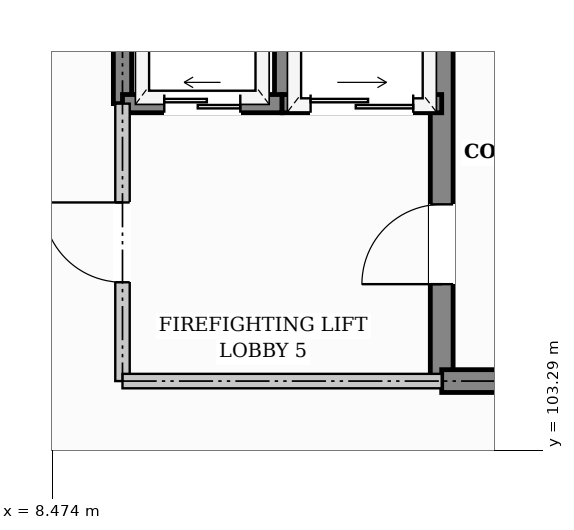
"""IFC4 building model, lengths in metres.
Left out: names, types, materials, properties, quantities, classifications, styles, units other than length and angle.
Written with IfcOpenShell. Run it as: python <this file> out.ifc"""

import sys

from ifc_helpers import new_model, si_unit, direction, frame, frame_2d, origin, place, context, subcontext, project, spatial, rectangle, extrude, element, fill, save


model = new_model("IFC4")
c1 = context("Model", 3, precision=1e-05, world=origin(), true_north=direction((0.0, 1.0)))
c2 = subcontext(c1, "Body", "Model", "MODEL_VIEW")
j1 = project(units=[si_unit("LENGTHUNIT", "METRE"), si_unit("PLANEANGLEUNIT", "RADIAN")], contexts=[c1])
p1 = place(None, origin())
s1 = spatial("IfcSite", under=j1, at=p1, CompositionType="ELEMENT")
p2 = place(p1, origin())
s2 = spatial("IfcBuilding", under=s1, at=p2, CompositionType="ELEMENT")
p3 = place(p2, frame((0.0, 0.0, 13.2)))
s3 = spatial("IfcBuildingStorey", under=s2, at=p3, CompositionType="ELEMENT", Elevation=13.2)
p4 = place(p3, frame((13.6, 104.2, 0.0), z_axis=(0.0, 0.0, 1.0), x_axis=(0.0, 1.0, 0.0)))
e1 = element("IfcWall", 1, at=p4, inside=s3, PredefinedType="SHEAR", context=c2, shape_type="SweptSolid", body=[
    extrude(rectangle(XDim=6.0, YDim=0.3, at=frame_2d((3.0, 0.0))), origin(), (0.0, 0.0, 1.0), 3.3),
])
p5 = place(p4, frame((1.275, 0.0, 0.0)))
e2 = element("IfcOpeningElement", 2, at=p5, cuts=e1, PredefinedType="OPENING", context=c2, shape_type="SweptSolid", body=[
    extrude(rectangle(XDim=1.05, YDim=2.15, at=frame_2d((0.525, 1.075))), frame((0.0, 0.16, 0.0), z_axis=(0.0, -1.0, 0.0), x_axis=(1.0, 0.0, 0.0)), (0.0, 0.0, 1.0), 0.32),
])
p6 = place(p3, frame((13.6, 104.2, 0.0), z_axis=(0.0, 0.0, 1.0), x_axis=(1.0, 0.0, 0.0)))
e3 = element("IfcWall", 3, at=p6, inside=s3, PredefinedType="SHEAR", context=c2, shape_type="SweptSolid", body=[
    extrude(rectangle(XDim=7.0, YDim=0.3, at=frame_2d((3.5, 0.0))), origin(), (0.0, 0.0, 1.0), 3.3),
])
p7 = place(p3, frame((9.4, 107.85, 0.0), z_axis=(0.0, 0.0, 1.0), x_axis=(0.0, 1.0, 0.0)))
e4 = element("IfcWall", 4, at=p7, inside=s3, PredefinedType="SHEAR", context=c2, shape_type="SweptSolid", body=[
    extrude(rectangle(XDim=2.35, YDim=0.24, at=frame_2d((1.175, 0.0))), origin(), (0.0, 0.0, 1.0), 3.3),
])
p8 = place(p3, frame((11.5, 107.85, 0.0), z_axis=(0.0, 0.0, 1.0), x_axis=(0.0, 1.0, 0.0)))
e5 = element("IfcWall", 5, at=p8, inside=s3, PredefinedType="SHEAR", context=c2, shape_type="SweptSolid", body=[
    extrude(rectangle(XDim=2.35, YDim=0.2, at=frame_2d((1.175, 0.0))), origin(), (0.0, 0.0, 1.0), 3.3),
])
p9 = place(p3, frame((9.4, 107.85, 0.0), z_axis=(0.0, 0.0, 1.0), x_axis=(1.0, 0.0, 0.0)))
e6 = element("IfcWall", 6, at=p9, inside=s3, PredefinedType="SHEAR", context=c2, shape_type="SweptSolid", body=[
    extrude(rectangle(XDim=2.1, YDim=0.24, at=frame_2d((1.05, 0.0))), origin(), (0.0, 0.0, 1.0), 3.3),
])
p10 = place(p9, frame((0.55, 0.0, 0.0)))
e7 = element("IfcOpeningElement", 7, at=p10, cuts=e6, PredefinedType="OPENING", context=c2, shape_type="SweptSolid", body=[
    extrude(rectangle(XDim=1.0, YDim=2.1, at=frame_2d((0.5, 1.05))), frame((0.0, 0.13, 0.0), z_axis=(0.0, -1.0, 0.0), x_axis=(1.0, 0.0, 0.0)), (0.0, 0.0, 1.0), 0.26),
])
p11 = place(p3, frame((11.5, 107.85, 0.0), z_axis=(0.0, 0.0, 1.0), x_axis=(1.0, 0.0, 0.0)))
e8 = element("IfcWall", 8, at=p11, inside=s3, PredefinedType="SHEAR", context=c2, shape_type="SweptSolid", body=[
    extrude(rectangle(XDim=2.1, YDim=0.24, at=frame_2d((1.05, 0.0))), origin(), (0.0, 0.0, 1.0), 3.3),
])
p12 = place(p11, frame((0.375, 0.0, 0.0)))
e9 = element("IfcOpeningElement", 9, at=p12, cuts=e8, PredefinedType="OPENING", context=c2, shape_type="SweptSolid", body=[
    extrude(rectangle(XDim=1.35, YDim=2.2, at=frame_2d((0.675, 1.1))), frame((0.0, 0.13, 0.0), z_axis=(0.0, -1.0, 0.0), x_axis=(1.0, 0.0, 0.0)), (0.0, 0.0, 1.0), 0.26),
])
p13 = place(p3, frame((9.4, 104.2, 0.0), z_axis=(0.0, 0.0, 1.0), x_axis=(0.0, 1.0, 0.0)))
e10 = element("IfcWall", 10, at=p13, inside=s3, PredefinedType="PARTITIONING", context=c2, shape_type="SweptSolid", body=[
    extrude(rectangle(XDim=3.65, YDim=0.19, at=frame_2d((1.825, 0.0))), origin(), (0.0, 0.0, 1.0), 3.3),
])
p14 = place(p13, frame((1.3, 0.0, 0.0)))
e11 = element("IfcOpeningElement", 11, at=p14, cuts=e10, PredefinedType="OPENING", context=c2, shape_type="SweptSolid", body=[
    extrude(rectangle(XDim=1.05, YDim=2.15, at=frame_2d((0.525, 1.075))), frame((0.0, 0.105, 0.0), z_axis=(0.0, -1.0, 0.0), x_axis=(1.0, 0.0, 0.0)), (0.0, 0.0, 1.0), 0.21),
])
p15 = place(p3, frame((9.4, 104.2, 0.0), z_axis=(0.0, 0.0, 1.0), x_axis=(1.0, 0.0, 0.0)))
e12 = element("IfcWall", 12, at=p15, inside=s3, PredefinedType="PARTITIONING", context=c2, shape_type="SweptSolid", body=[
    extrude(rectangle(XDim=4.2, YDim=0.19, at=frame_2d((2.1, 0.0))), origin(), (0.0, 0.0, 1.0), 3.3),
])
p16 = place(p5, origin())
e13 = element("IfcDoor", 13, at=p16, inside=s3, OperationType="SINGLE_SWING_LEFT", PredefinedType="DOOR", context=c2, shape_type="SweptSolid", body=[
    extrude(rectangle(XDim=1.05, YDim=2.15, at=frame_2d((0.525, 1.075))), frame((0.0, 0.025, 0.0), z_axis=(0.0, -1.0, 0.0), x_axis=(1.0, 0.0, 0.0)), (0.0, 0.0, 1.0), 0.05),
])
fill(e2, e13)
p17 = place(p10, origin())
e14 = element("IfcDoor", 14, at=p17, inside=s3, OperationType="SLIDING_TO_LEFT", PredefinedType="DOOR", context=c2, shape_type="SweptSolid", body=[
    extrude(rectangle(XDim=1.0, YDim=2.1, at=frame_2d((0.5, 1.05))), frame((0.0, 0.025, 0.0), z_axis=(0.0, -1.0, 0.0), x_axis=(1.0, 0.0, 0.0)), (0.0, 0.0, 1.0), 0.05),
])
fill(e7, e14)
p18 = place(p12, origin())
e15 = element("IfcDoor", 15, at=p18, inside=s3, OperationType="SLIDING_TO_RIGHT", PredefinedType="DOOR", context=c2, shape_type="SweptSolid", body=[
    extrude(rectangle(XDim=1.35, YDim=2.2, at=frame_2d((0.675, 1.1))), frame((0.0, 0.025, 0.0), z_axis=(0.0, -1.0, 0.0), x_axis=(1.0, 0.0, 0.0)), (0.0, 0.0, 1.0), 0.05),
])
fill(e9, e15)
p19 = place(p14, origin())
e16 = element("IfcDoor", 16, at=p19, inside=s3, OperationType="SINGLE_SWING_RIGHT", PredefinedType="DOOR", context=c2, shape_type="SweptSolid", body=[
    extrude(rectangle(XDim=1.05, YDim=2.15, at=frame_2d((0.525, 1.075))), frame((0.0, 0.025, 0.0), z_axis=(0.0, -1.0, 0.0), x_axis=(1.0, 0.0, 0.0)), (0.0, 0.0, 1.0), 0.05),
])
fill(e11, e16)
save(model, sys.argv[1])
